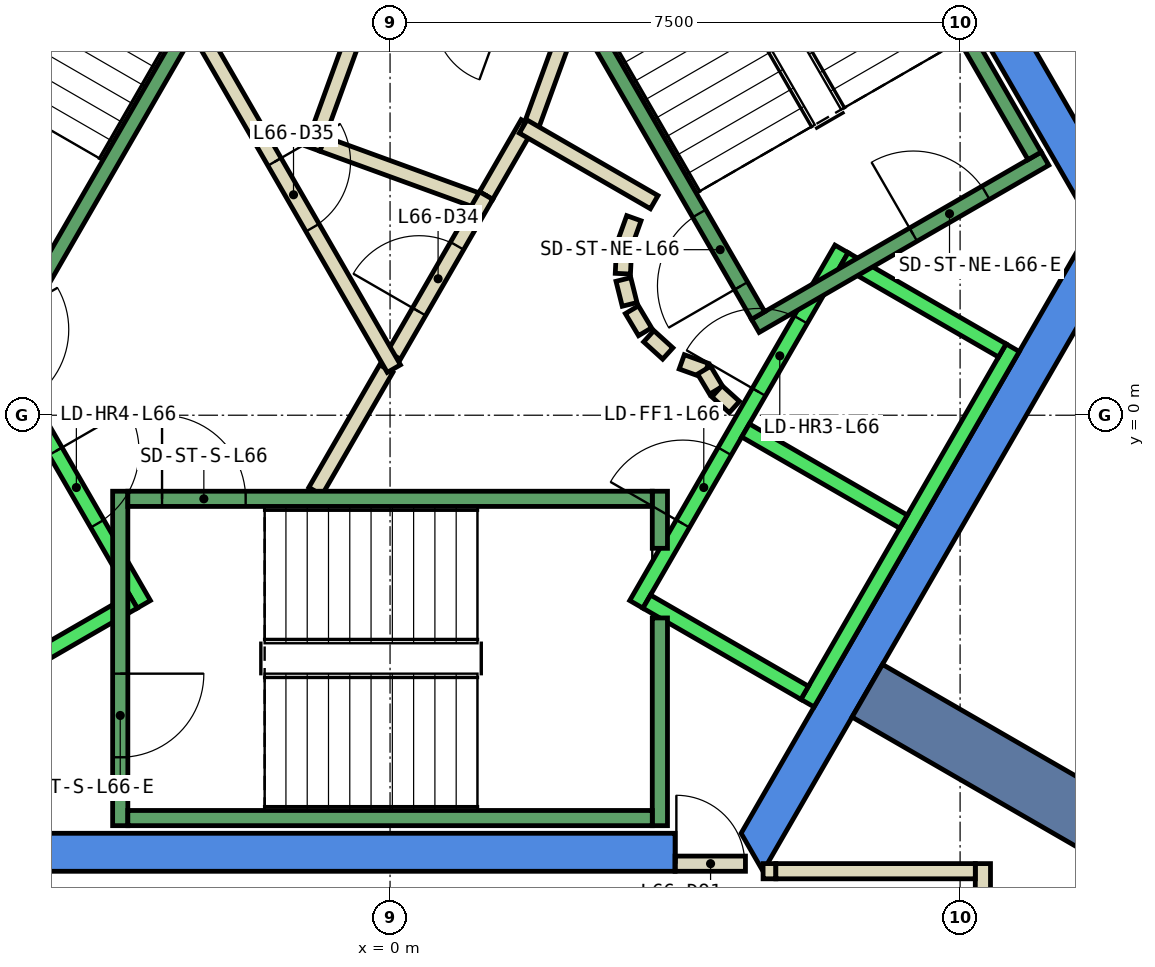
"""IFC4 building model, lengths in metres.
Left out: names, types, materials, properties, quantities, classifications, styles, units other than length and angle.
Written with IfcOpenShell. Run it as: python <this file> out.ifc"""

import sys

from ifc_helpers import new_model, si_unit, direction, frame, frame_2d, origin, place, context, subcontext, project, spatial, polyline, rectangle, outline, extrude, element, fill, save


model = new_model("IFC4")
c1 = context("Model", 3, precision=1e-05, world=origin(), true_north=direction((0.0, 1.0)))
c2 = subcontext(c1, "Body", "Model", "MODEL_VIEW")
j1 = project(units=[si_unit("LENGTHUNIT", "METRE"), si_unit("PLANEANGLEUNIT", "RADIAN")], contexts=[c1])
p1 = place(None, origin())
s1 = spatial("IfcSite", under=j1, at=p1, CompositionType="ELEMENT")
p2 = place(p1, origin())
s2 = spatial("IfcBuilding", under=s1, at=p2, CompositionType="ELEMENT")
p3 = place(p2, frame((0.0, 0.0, 286.4)))
s3 = spatial("IfcBuildingStorey", under=s2, at=p3, CompositionType="ELEMENT", Elevation=286.4)
p4 = place(p3, frame((0.0, 0.0, -0.6)))
e1 = element("IfcWall", 1, at=p4, inside=s3, PredefinedType="SHEAR", context=c2, shape_type="SweptSolid", body=[
    extrude(outline(polyline([(5.486, 9.998), (5.053, 9.748), (9.238, 2.5), (9.815, 2.5), (5.486, 9.998)])), origin(), (0.0, 0.0, 1.0), 3.86),
])
p5 = place(p3, frame((0.0, 0.0, -0.6)))
e2 = element("IfcWall", 2, at=p5, inside=s3, PredefinedType="SHEAR", context=c2, shape_type="SweptSolid", body=[
    extrude(outline(polyline([(3.75, -6.0), (3.75, -5.5), (-4.619, -5.5), (-4.907, -6.0), (3.75, -6.0)])), origin(), (0.0, 0.0, 1.0), 3.86),
])
p6 = place(p3, frame((0.0, 0.0, -0.6)))
e3 = element("IfcWall", 3, at=p6, inside=s3, PredefinedType="SHEAR", context=c2, shape_type="SweptSolid", body=[
    extrude(outline(polyline([(4.907, -6.0), (9.815, 2.5), (9.238, 2.5), (4.619, -5.5), (4.907, -6.0)])), origin(), (0.0, 0.0, 1.0), 3.86),
])
p7 = place(p3, frame((6.279, -3.625, -0.6), z_axis=(0.0, 0.0, 1.0), x_axis=(0.866017533419, -0.500013631625, 0.0)))
e4 = element("IfcWall", 4, at=p7, inside=s3, PredefinedType="SHEAR", context=c2, shape_type="SweptSolid", body=[
    extrude(rectangle(XDim=9.0, YDim=0.8, at=frame_2d((4.5, 0.0))), origin(), (0.0, 0.0, 1.0), 3.86),
])
p8 = place(p3, frame((1.264, 2.89, 0.0), z_axis=(0.0, 0.0, 1.0), x_axis=(0.500043792738, 0.866000118559, 0.0)))
e5 = element("IfcWall", 5, at=p8, inside=s3, PredefinedType="PARTITIONING", context=c2, shape_type="SweptSolid", body=[
    extrude(rectangle(XDim=1.096, YDim=0.2, at=frame_2d((0.548, 0.0))), origin(), (0.0, 0.0, 1.0), 3.26),
])
p9 = place(p3, frame((1.838, 3.748, 0.0), z_axis=(0.0, 0.0, 1.0), x_axis=(0.342266462435, 0.939602931398, 0.0)))
e6 = element("IfcWall", 6, at=p9, inside=s3, PredefinedType="PARTITIONING", context=c2, shape_type="SweptSolid", body=[
    extrude(rectangle(XDim=1.198, YDim=0.2, at=frame_2d((0.599, 0.0))), origin(), (0.0, 0.0, 1.0), 3.26),
])
p10 = place(p3, frame((-0.196, 5.764, 0.0), z_axis=(0.0, 0.0, 1.0), x_axis=(-0.34165322761, -0.939826086073, 0.0)))
e7 = element("IfcWall", 7, at=p10, inside=s3, PredefinedType="PARTITIONING", context=c2, shape_type="SweptSolid", body=[
    extrude(rectangle(XDim=2.4, YDim=0.2, at=frame_2d((1.2, 0.0))), origin(), (0.0, 0.0, 1.0), 3.26),
])
p11 = place(p3, frame((-0.888, 3.568, 0.0), z_axis=(0.0, 0.0, 1.0), x_axis=(0.939685034098, -0.34204098686, 0.0)))
e8 = element("IfcWall", 8, at=p11, inside=s3, PredefinedType="PARTITIONING", context=c2, shape_type="SweptSolid", body=[
    extrude(rectangle(XDim=2.237, YDim=0.2, at=frame_2d((1.119, 0.0))), origin(), (0.0, 0.0, 1.0), 3.26),
])
p12 = place(p3, frame((-0.982, -1.0, 0.0), z_axis=(0.0, 0.0, 1.0), x_axis=(0.50024047865, 0.865886518847, 0.0)))
e9 = element("IfcWall", 9, at=p12, inside=s3, PredefinedType="PARTITIONING", context=c2, shape_type="SweptSolid", body=[
    extrude(rectangle(XDim=1.863, YDim=0.2, at=frame_2d((0.931, 0.0))), origin(), (0.0, 0.0, 1.0), 3.26),
])
p13 = place(p3, frame((0.05, 0.787, 0.0), z_axis=(0.0, 0.0, 1.0), x_axis=(0.499945861543, 0.866056658381, 0.0)))
e10 = element("IfcWall", 10, at=p13, inside=s3, PredefinedType="PARTITIONING", context=c2, shape_type="SweptSolid", body=[
    extrude(rectangle(XDim=2.428, YDim=0.2, at=frame_2d((1.214, 0.0))), origin(), (0.0, 0.0, 1.0), 3.26),
])
p14 = place(p13, frame((0.664, 0.0, 0.0)))
e11 = element("IfcOpeningElement", 11, at=p14, cuts=e10, PredefinedType="OPENING", context=c2, shape_type="SweptSolid", body=[
    extrude(rectangle(XDim=1.0, YDim=2.1, at=frame_2d((0.5, 1.05))), frame((0.0, 0.11, 0.0), z_axis=(0.0, -1.0, 0.0), x_axis=(1.0, 0.0, 0.0)), (0.0, 0.0, 1.0), 0.22),
])
p15 = place(p3, frame((1.751, 3.798, 0.0), z_axis=(0.0, 0.0, 1.0), x_axis=(0.866091650241, -0.499885240213, 0.0)))
e12 = element("IfcWall", 12, at=p15, inside=s3, PredefinedType="PARTITIONING", context=c2, shape_type="SweptSolid", body=[
    extrude(rectangle(XDim=1.991, YDim=0.2, at=frame_2d((0.995, 0.0))), origin(), (0.0, 0.0, 1.0), 3.26),
])
p16 = place(p3, frame((3.208, 2.592, 0.0), z_axis=(0.0, 0.0, 1.0), x_axis=(-0.337388820924, -0.941365382578, 0.0)))
e13 = element("IfcWall", 13, at=p16, inside=s3, PredefinedType="PARTITIONING", context=c2, shape_type="SweptSolid", body=[
    extrude(rectangle(XDim=0.338, YDim=0.2, at=frame_2d((0.169, 0.0))), origin(), (0.0, 0.0, 1.0), 3.26),
])
p17 = place(p3, frame((3.079, 2.199, 0.0), z_axis=(0.0, 0.0, 1.0), x_axis=(-0.047771483479, -0.998858290933, 0.0)))
e14 = element("IfcWall", 14, at=p17, inside=s3, PredefinedType="PARTITIONING", context=c2, shape_type="SweptSolid", body=[
    extrude(rectangle(XDim=0.337, YDim=0.2, at=frame_2d((0.169, 0.0))), origin(), (0.0, 0.0, 1.0), 3.26),
])
p18 = place(p3, frame((3.07, 1.786, 0.0), z_axis=(0.0, 0.0, 1.0), x_axis=(0.242705583207, -0.970099994784, 0.0)))
e15 = element("IfcWall", 15, at=p18, inside=s3, PredefinedType="PARTITIONING", context=c2, shape_type="SweptSolid", body=[
    extrude(rectangle(XDim=0.338, YDim=0.2, at=frame_2d((0.169, 0.0))), origin(), (0.0, 0.0, 1.0), 3.26),
])
for number, where, z_axis, x_axis in (
    (16, (3.182, 1.388, 0.0), (0.0, 0.0, 1.0), (0.512, -0.859, 0.0)),
    (17, (3.404, 1.039, 0.0), (0.0, 0.0, 1.0), (0.74, -0.672, 0.0)),
):
    element("IfcWall", number, at=place(p3, frame(where, z_axis=z_axis, x_axis=x_axis)), inside=s3, PredefinedType="PARTITIONING", context=c2, shape_type="SweptSolid", body=[
        extrude(rectangle(XDim=0.338, YDim=0.2, at=frame_2d((0.169, 0.0))), origin(), (0.0, 0.0, 1.0), 3.26),
    ])
p19 = place(p3, frame((3.838, 0.702, 0.0), z_axis=(0.0, 0.0, 1.0), x_axis=(0.941035081519, -0.338308993895, 0.0)))
e18 = element("IfcWall", 18, at=p19, inside=s3, PredefinedType="PARTITIONING", context=c2, shape_type="SweptSolid", body=[
    extrude(rectangle(XDim=0.337, YDim=0.2, at=frame_2d((0.168, 0.0))), origin(), (0.0, 0.0, 1.0), 3.26),
])
p20 = place(p3, frame((4.132, 0.593, 0.0), z_axis=(0.0, 0.0, 1.0), x_axis=(0.513561617048, -0.858052717201, 0.0)))
e19 = element("IfcWall", 19, at=p20, inside=s3, PredefinedType="PARTITIONING", context=c2, shape_type="SweptSolid", body=[
    extrude(rectangle(XDim=0.308, YDim=0.2, at=frame_2d((0.154, 0.0))), origin(), (0.0, 0.0, 1.0), 3.26),
])
p21 = place(p3, frame((4.301, 0.315, 0.0), z_axis=(0.0, 0.0, 1.0), x_axis=(0.741798017506, -0.670623367639, 0.0)))
e20 = element("IfcWall", 20, at=p21, inside=s3, PredefinedType="PARTITIONING", context=c2, shape_type="SweptSolid", body=[
    extrude(rectangle(XDim=0.309, YDim=0.2, at=frame_2d((0.154, 0.0))), origin(), (0.0, 0.0, 1.0), 3.26),
])
p22 = place(p3, frame((-2.54, 5.1, 0.0), z_axis=(0.0, 0.0, 1.0), x_axis=(0.499925051871, -0.866068670783, 0.0)))
e21 = element("IfcWall", 21, at=p22, inside=s3, PredefinedType="PARTITIONING", context=c2, shape_type="SweptSolid", body=[
    extrude(rectangle(XDim=5.181, YDim=0.2, at=frame_2d((2.59, 0.0))), origin(), (0.0, 0.0, 1.0), 3.26),
])
p23 = place(p22, frame((2.04, 0.0, 0.0)))
e22 = element("IfcOpeningElement", 22, at=p23, cuts=e21, PredefinedType="OPENING", context=c2, shape_type="SweptSolid", body=[
    extrude(rectangle(XDim=1.0, YDim=2.1, at=frame_2d((0.5, 1.05))), frame((0.0, 0.11, 0.0), z_axis=(0.0, -1.0, 0.0), x_axis=(1.0, 0.0, 0.0)), (0.0, 0.0, 1.0), 0.22),
])
p24 = place(p3, frame((4.908, -5.999, 0.0), z_axis=(0.0, 0.0, 1.0), x_axis=(1.0, 0.0, 0.0)))
e23 = element("IfcWall", 23, at=p24, inside=s3, PredefinedType="PARTITIONING", context=c2, shape_type="SweptSolid", body=[
    extrude(rectangle(XDim=0.168, YDim=0.2, at=frame_2d((0.084, 0.0))), origin(), (0.0, 0.0, 1.0), 2.4),
])
p25 = place(p3, frame((7.8, -5.899, 0.0), z_axis=(0.0, 0.0, 1.0), x_axis=(0.0, -1.0, 0.0)))
e24 = element("IfcWall", 24, at=p25, inside=s3, PredefinedType="PARTITIONING", context=c2, shape_type="SweptSolid", body=[
    extrude(rectangle(XDim=3.876, YDim=0.2, at=frame_2d((1.938, 0.0))), origin(), (0.0, 0.0, 1.0), 3.26),
])
p26 = place(p3, frame((3.75, -5.9, 0.0), z_axis=(0.0, 0.0, 1.0), x_axis=(1.0, 0.0, 0.0)))
e25 = element("IfcWall", 25, at=p26, inside=s3, PredefinedType="PARTITIONING", context=c2, shape_type="SweptSolid", body=[
    extrude(rectangle(XDim=0.926, YDim=0.2, at=frame_2d((0.463, 0.0))), origin(), (0.0, 0.0, 1.0), 2.4),
])
p27 = place(p26, frame((0.017, 0.0, 0.0)))
e26 = element("IfcOpeningElement", 26, at=p27, cuts=e25, PredefinedType="OPENING", context=c2, shape_type="SweptSolid", body=[
    extrude(rectangle(XDim=0.9, YDim=2.1, at=frame_2d((0.45, 1.05))), frame((0.0, 0.11, 0.0), z_axis=(0.0, -1.0, 0.0), x_axis=(1.0, 0.0, 0.0)), (0.0, 0.0, 1.0), 0.22),
])
p28 = place(p3, frame((5.076, -5.999, 0.0), z_axis=(0.0, 0.0, 1.0), x_axis=(1.0, 0.0, 0.0)))
e27 = element("IfcWall", 27, at=p28, inside=s3, PredefinedType="PARTITIONING", context=c2, shape_type="SweptSolid", body=[
    extrude(rectangle(XDim=2.624, YDim=0.2, at=frame_2d((1.312, 0.0))), origin(), (0.0, 0.0, 1.0), 3.26),
])
p29 = place(p3, frame((-5.94, 2.188, 0.0), z_axis=(0.0, 0.0, 1.0), x_axis=(0.500034260056, -0.866005622828, 0.0)))
e28 = element("IfcWall", 28, at=p29, inside=s3, PredefinedType="STANDARD", context=c2, shape_type="SweptSolid", body=[
    extrude(rectangle(XDim=5.399, YDim=0.2, at=frame_2d((2.7, 0.0))), origin(), (0.0, 0.0, 1.0), 3.26),
])
p30 = place(p29, frame((3.075, 0.0, 0.0)))
e29 = element("IfcOpeningElement", 29, at=p30, cuts=e28, PredefinedType="OPENING", context=c2, shape_type="SweptSolid", body=[
    extrude(rectangle(XDim=1.1, YDim=2.1, at=frame_2d((0.55, 1.05))), frame((0.0, 0.11, 0.0), z_axis=(0.0, -1.0, 0.0), x_axis=(1.0, 0.0, 0.0)), (0.0, 0.0, 1.0), 0.22),
])
p31 = place(p29, frame((1.225, 0.0, 0.0)))
e30 = element("IfcOpeningElement", 30, at=p31, cuts=e28, PredefinedType="OPENING", context=c2, shape_type="SweptSolid", body=[
    extrude(rectangle(XDim=1.1, YDim=2.1, at=frame_2d((0.55, 1.05))), frame((0.0, 0.11, 0.0), z_axis=(0.0, -1.0, 0.0), x_axis=(1.0, 0.0, 0.0)), (0.0, 0.0, 1.0), 0.22),
])
p32 = place(p3, frame((-3.377, -2.452, 0.0), z_axis=(0.0, 0.0, 1.0), x_axis=(-0.865955154139, -0.50012165622, 0.0)))
e31 = element("IfcWall", 31, at=p32, inside=s3, PredefinedType="STANDARD", context=c2, shape_type="SweptSolid", body=[
    extrude(rectangle(XDim=2.4, YDim=0.2, at=frame_2d((1.2, 0.0))), origin(), (0.0, 0.0, 1.0), 3.26),
])
p33 = place(p3, frame((3.24, -2.488, 0.0), z_axis=(0.0, 0.0, 1.0), x_axis=(0.500034260056, 0.866005622828, 0.0)))
e32 = element("IfcWall", 32, at=p33, inside=s3, PredefinedType="STANDARD", context=c2, shape_type="SweptSolid", body=[
    extrude(rectangle(XDim=5.399, YDim=0.2, at=frame_2d((2.7, 0.0))), origin(), (0.0, 0.0, 1.0), 3.26),
])
p34 = place(p33, frame((3.225, 0.0, 0.0)))
e33 = element("IfcOpeningElement", 33, at=p34, cuts=e32, PredefinedType="OPENING", context=c2, shape_type="SweptSolid", body=[
    extrude(rectangle(XDim=1.1, YDim=2.1, at=frame_2d((0.55, 1.05))), frame((0.0, 0.11, 0.0), z_axis=(0.0, -1.0, 0.0), x_axis=(1.0, 0.0, 0.0)), (0.0, 0.0, 1.0), 0.22),
])
p35 = place(p33, frame((1.225, 0.0, 0.0)))
e34 = element("IfcOpeningElement", 34, at=p35, cuts=e32, PredefinedType="OPENING", context=c2, shape_type="SweptSolid", body=[
    extrude(rectangle(XDim=1.1, YDim=2.1, at=frame_2d((0.55, 1.05))), frame((0.0, 0.11, 0.0), z_axis=(0.0, -1.0, 0.0), x_axis=(1.0, 0.0, 0.0)), (0.0, 0.0, 1.0), 0.22),
])
p36 = place(p3, frame((5.492, -3.788, 0.0), z_axis=(0.0, 0.0, 1.0), x_axis=(0.500034260056, 0.866005622828, 0.0)))
e35 = element("IfcWall", 35, at=p36, inside=s3, PredefinedType="STANDARD", context=c2, shape_type="SweptSolid", body=[
    extrude(rectangle(XDim=5.399, YDim=0.2, at=frame_2d((2.7, 0.0))), origin(), (0.0, 0.0, 1.0), 3.26),
])
p37 = place(p3, frame((3.377, -2.452, 0.0), z_axis=(0.0, 0.0, 1.0), x_axis=(0.865955154139, -0.50012165622, 0.0)))
e36 = element("IfcWall", 36, at=p37, inside=s3, PredefinedType="STANDARD", context=c2, shape_type="SweptSolid", body=[
    extrude(rectangle(XDim=2.4, YDim=0.2, at=frame_2d((1.2, 0.0))), origin(), (0.0, 0.0, 1.0), 3.26),
])
for number, where, z_axis, x_axis in (
    (37, (4.677, -0.2, 0.0), (0.0, 0.0, 1.0), (0.866, -0.5, 0.0)),
    (38, (5.977, 2.052, 0.0), (0.0, 0.0, 1.0), (0.866, -0.5, 0.0)),
):
    element("IfcWall", number, at=place(p3, frame(where, z_axis=z_axis, x_axis=x_axis)), inside=s3, PredefinedType="STANDARD", context=c2, shape_type="SweptSolid", body=[
        extrude(rectangle(XDim=2.399, YDim=0.2, at=frame_2d((1.2, 0.0))), origin(), (0.0, 0.0, 1.0), 3.26),
    ])
p38 = place(p3, frame((-3.55, -1.0, 0.0), z_axis=(0.0, 0.0, 1.0), x_axis=(0.0, -1.0, 0.0)))
e39 = element("IfcWall", 39, at=p38, inside=s3, PredefinedType="STANDARD", context=c2, shape_type="SweptSolid", body=[
    extrude(rectangle(XDim=4.4, YDim=0.2, at=frame_2d((2.2, 0.0))), origin(), (0.0, 0.0, 1.0), 3.26),
])
p39 = place(p38, frame((2.4, 0.0, 0.0)))
e40 = element("IfcOpeningElement", 40, at=p39, cuts=e39, PredefinedType="OPENING", context=c2, shape_type="SweptSolid", body=[
    extrude(rectangle(XDim=1.1, YDim=2.2, at=frame_2d((0.55, 1.1))), frame((0.0, 0.11, 0.0), z_axis=(0.0, -1.0, 0.0), x_axis=(1.0, 0.0, 0.0)), (0.0, 0.0, 1.0), 0.22),
])
p40 = place(p3, frame((3.55, -2.667, 0.0), z_axis=(0.0, 0.0, 1.0), x_axis=(0.0, -1.0, 0.0)))
e41 = element("IfcWall", 41, at=p40, inside=s3, PredefinedType="STANDARD", context=c2, shape_type="SweptSolid", body=[
    extrude(rectangle(XDim=2.733, YDim=0.2, at=frame_2d((1.366, 0.0))), origin(), (0.0, 0.0, 1.0), 3.26),
])
p41 = place(p3, frame((3.55, -1.0, 0.0), z_axis=(0.0, 0.0, 1.0), x_axis=(0.0, -1.0, 0.0)))
e42 = element("IfcWall", 42, at=p41, inside=s3, PredefinedType="STANDARD", context=c2, shape_type="SweptSolid", body=[
    extrude(rectangle(XDim=0.751, YDim=0.2, at=frame_2d((0.375, 0.0))), origin(), (0.0, 0.0, 1.0), 3.26),
])
p42 = place(p3, frame((-3.45, -1.1, 0.0), z_axis=(0.0, 0.0, 1.0), x_axis=(1.0, 0.0, 0.0)))
e43 = element("IfcWall", 43, at=p42, inside=s3, PredefinedType="STANDARD", context=c2, shape_type="SweptSolid", body=[
    extrude(rectangle(XDim=6.9, YDim=0.2, at=frame_2d((3.45, 0.0))), origin(), (0.0, 0.0, 1.0), 3.26),
])
p43 = place(p42, frame((0.45, 0.0, 0.0)))
e44 = element("IfcOpeningElement", 44, at=p43, cuts=e43, PredefinedType="OPENING", context=c2, shape_type="SweptSolid", body=[
    extrude(rectangle(XDim=1.1, YDim=2.2, at=frame_2d((0.55, 1.1))), frame((0.0, 0.11, 0.0), z_axis=(0.0, -1.0, 0.0), x_axis=(1.0, 0.0, 0.0)), (0.0, 0.0, 1.0), 0.22),
])
p44 = place(p3, frame((-3.45, -5.3, 0.0), z_axis=(0.0, 0.0, 1.0), x_axis=(1.0, 0.0, 0.0)))
e45 = element("IfcWall", 45, at=p44, inside=s3, PredefinedType="STANDARD", context=c2, shape_type="SweptSolid", body=[
    extrude(rectangle(XDim=6.9, YDim=0.2, at=frame_2d((3.45, 0.0))), origin(), (0.0, 0.0, 1.0), 3.26),
])
p45 = place(p3, frame((4.806, 1.176, 0.0), z_axis=(0.0, 0.0, 1.0), x_axis=(0.866059941101, 0.499940174841, 0.0)))
e46 = element("IfcWall", 46, at=p45, inside=s3, PredefinedType="STANDARD", context=c2, shape_type="SweptSolid", body=[
    extrude(rectangle(XDim=4.4, YDim=0.2, at=frame_2d((2.2, 0.0))), origin(), (0.0, 0.0, 1.0), 3.26),
])
p46 = place(p45, frame((2.4, 0.0, 0.0)))
e47 = element("IfcOpeningElement", 47, at=p46, cuts=e46, PredefinedType="OPENING", context=c2, shape_type="SweptSolid", body=[
    extrude(rectangle(XDim=1.1, YDim=2.2, at=frame_2d((0.55, 1.1))), frame((0.0, 0.11, 0.0), z_axis=(0.0, -1.0, 0.0), x_axis=(1.0, 0.0, 0.0)), (0.0, 0.0, 1.0), 0.22),
])
p47 = place(p3, frame((4.843, 1.312, 0.0), z_axis=(0.0, 0.0, 1.0), x_axis=(-0.499963383562, 0.866046543262, 0.0)))
e48 = element("IfcWall", 48, at=p47, inside=s3, PredefinedType="STANDARD", context=c2, shape_type="SweptSolid", body=[
    extrude(rectangle(XDim=6.9, YDim=0.2, at=frame_2d((3.45, 0.0))), origin(), (0.0, 0.0, 1.0), 3.26),
])
p48 = place(p47, frame((0.45, 0.0, 0.0)))
e49 = element("IfcOpeningElement", 49, at=p48, cuts=e48, PredefinedType="OPENING", context=c2, shape_type="SweptSolid", body=[
    extrude(rectangle(XDim=1.1, YDim=2.2, at=frame_2d((0.55, 1.1))), frame((0.0, 0.11, 0.0), z_axis=(0.0, -1.0, 0.0), x_axis=(1.0, 0.0, 0.0)), (0.0, 0.0, 1.0), 0.22),
])
p49 = place(p3, frame((8.48, 3.412, 0.0), z_axis=(0.0, 0.0, 1.0), x_axis=(-0.499978703459, 0.866037698999, 0.0)))
e50 = element("IfcWall", 50, at=p49, inside=s3, PredefinedType="STANDARD", context=c2, shape_type="SweptSolid", body=[
    extrude(rectangle(XDim=6.9, YDim=0.2, at=frame_2d((3.45, 0.0))), origin(), (0.0, 0.0, 1.0), 3.26),
])
p50 = place(p3, frame((-1.393, 7.288, 0.0), z_axis=(0.0, 0.0, 1.0), x_axis=(-0.499963383562, -0.866046543262, 0.0)))
e51 = element("IfcWall", 51, at=p50, inside=s3, PredefinedType="STANDARD", context=c2, shape_type="SweptSolid", body=[
    extrude(rectangle(XDim=6.9, YDim=0.2, at=frame_2d((3.45, 0.0))), origin(), (0.0, 0.0, 1.0), 3.26),
])
p51 = place(p50, frame((0.45, 0.0, 0.0)))
e52 = element("IfcOpeningElement", 52, at=p51, cuts=e51, PredefinedType="OPENING", context=c2, shape_type="SweptSolid", body=[
    extrude(rectangle(XDim=1.1, YDim=2.2, at=frame_2d((0.55, 1.1))), frame((0.0, 0.11, 0.0), z_axis=(0.0, -1.0, 0.0), x_axis=(1.0, 0.0, 0.0)), (0.0, 0.0, 1.0), 0.22),
])
p52 = place(p14, origin())
e53 = element("IfcDoor", 53, at=p52, inside=s3, OperationType="SINGLE_SWING_RIGHT", PredefinedType="DOOR", context=c2, shape_type="SweptSolid", body=[
    extrude(rectangle(XDim=1.0, YDim=2.1, at=frame_2d((0.5, 1.05))), frame((0.0, 0.025, 0.0), z_axis=(0.0, -1.0, 0.0), x_axis=(1.0, 0.0, 0.0)), (0.0, 0.0, 1.0), 0.05),
])
fill(e11, e53)
p53 = place(p23, origin())
e54 = element("IfcDoor", 54, at=p53, inside=s3, OperationType="SINGLE_SWING_RIGHT", PredefinedType="DOOR", context=c2, shape_type="SweptSolid", body=[
    extrude(rectangle(XDim=1.0, YDim=2.1, at=frame_2d((0.5, 1.05))), frame((0.0, 0.025, 0.0), z_axis=(0.0, -1.0, 0.0), x_axis=(1.0, 0.0, 0.0)), (0.0, 0.0, 1.0), 0.05),
])
fill(e22, e54)
p54 = place(p27, origin())
e55 = element("IfcDoor", 55, at=p54, inside=s3, OperationType="SINGLE_SWING_LEFT", PredefinedType="DOOR", context=c2, shape_type="SweptSolid", body=[
    extrude(rectangle(XDim=0.9, YDim=2.1, at=frame_2d((0.45, 1.05))), frame((0.0, 0.025, 0.0), z_axis=(0.0, -1.0, 0.0), x_axis=(1.0, 0.0, 0.0)), (0.0, 0.0, 1.0), 0.05),
])
fill(e26, e55)
p55 = place(p34, origin())
e56 = element("IfcDoor", 56, at=p55, inside=s3, OperationType="SLIDING_TO_LEFT", PredefinedType="DOOR", context=c2, shape_type="SweptSolid", body=[
    extrude(rectangle(XDim=1.1, YDim=2.1, at=frame_2d((0.55, 1.05))), frame((0.0, 0.025, 0.0), z_axis=(0.0, -1.0, 0.0), x_axis=(1.0, 0.0, 0.0)), (0.0, 0.0, 1.0), 0.05),
])
fill(e33, e56)
p56 = place(p30, origin())
e57 = element("IfcDoor", 57, at=p56, inside=s3, OperationType="SLIDING_TO_LEFT", PredefinedType="DOOR", context=c2, shape_type="SweptSolid", body=[
    extrude(rectangle(XDim=1.1, YDim=2.1, at=frame_2d((0.55, 1.05))), frame((0.0, 0.025, 0.0), z_axis=(0.0, -1.0, 0.0), x_axis=(1.0, 0.0, 0.0)), (0.0, 0.0, 1.0), 0.05),
])
fill(e29, e57)
p57 = place(p35, origin())
e58 = element("IfcDoor", 58, at=p57, inside=s3, OperationType="SLIDING_TO_LEFT", PredefinedType="DOOR", context=c2, shape_type="SweptSolid", body=[
    extrude(rectangle(XDim=1.1, YDim=2.1, at=frame_2d((0.55, 1.05))), frame((0.0, 0.025, 0.0), z_axis=(0.0, -1.0, 0.0), x_axis=(1.0, 0.0, 0.0)), (0.0, 0.0, 1.0), 0.05),
])
fill(e34, e58)
p58 = place(p43, origin())
e59 = element("IfcDoor", 59, at=p58, inside=s3, OperationType="SINGLE_SWING_LEFT", PredefinedType="DOOR", context=c2, shape_type="SweptSolid", body=[
    extrude(rectangle(XDim=1.1, YDim=2.2, at=frame_2d((0.55, 1.1))), frame((0.0, 0.025, 0.0), z_axis=(0.0, -1.0, 0.0), x_axis=(1.0, 0.0, 0.0)), (0.0, 0.0, 1.0), 0.05),
])
fill(e44, e59)
p59 = place(p39, origin())
e60 = element("IfcDoor", 60, at=p59, inside=s3, OperationType="SINGLE_SWING_LEFT", PredefinedType="DOOR", context=c2, shape_type="SweptSolid", body=[
    extrude(rectangle(XDim=1.1, YDim=2.2, at=frame_2d((0.55, 1.1))), frame((0.0, 0.025, 0.0), z_axis=(0.0, -1.0, 0.0), x_axis=(1.0, 0.0, 0.0)), (0.0, 0.0, 1.0), 0.05),
])
fill(e40, e60)
p60 = place(p48, origin())
e61 = element("IfcDoor", 61, at=p60, inside=s3, OperationType="SINGLE_SWING_LEFT", PredefinedType="DOOR", context=c2, shape_type="SweptSolid", body=[
    extrude(rectangle(XDim=1.1, YDim=2.2, at=frame_2d((0.55, 1.1))), frame((0.0, 0.025, 0.0), z_axis=(0.0, -1.0, 0.0), x_axis=(1.0, 0.0, 0.0)), (0.0, 0.0, 1.0), 0.05),
])
fill(e49, e61)
p61 = place(p46, origin())
e62 = element("IfcDoor", 62, at=p61, inside=s3, OperationType="SINGLE_SWING_LEFT", PredefinedType="DOOR", context=c2, shape_type="SweptSolid", body=[
    extrude(rectangle(XDim=1.1, YDim=2.2, at=frame_2d((0.55, 1.1))), frame((0.0, 0.025, 0.0), z_axis=(0.0, -1.0, 0.0), x_axis=(1.0, 0.0, 0.0)), (0.0, 0.0, 1.0), 0.05),
])
fill(e47, e62)
save(model, sys.argv[1])
